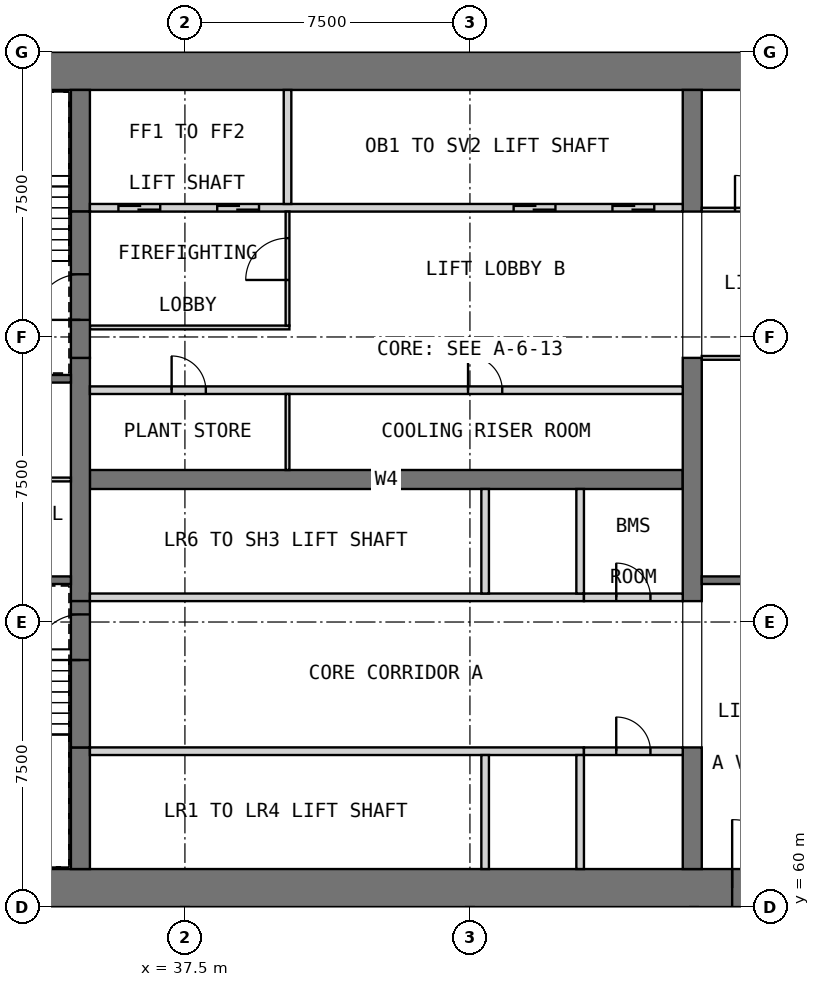
"""IFC4 building model, lengths in metres.
Left out: names, types, materials, properties, quantities, classifications, styles, units other than length and angle.
Written with IfcOpenShell. Run it as: python <this file> out.ifc"""

import sys

from ifc_helpers import new_model, si_unit, direction, frame, frame_2d, origin, place, context, subcontext, project, spatial, rectangle, extrude, element, fill, save


model = new_model("IFC4")
c1 = context("Model", 3, precision=1e-05, world=origin(), true_north=direction((0.0, 1.0)))
c2 = subcontext(c1, "Body", "Model", "MODEL_VIEW")
j1 = project(units=[si_unit("LENGTHUNIT", "METRE"), si_unit("PLANEANGLEUNIT", "RADIAN")], contexts=[c1])
p1 = place(None, origin())
s1 = spatial("IfcSite", under=j1, at=p1, CompositionType="ELEMENT")
p2 = place(p1, origin())
s2 = spatial("IfcBuilding", under=s1, at=p2, CompositionType="ELEMENT")
p3 = place(p2, frame((0.0, 0.0, 73.6)))
s3 = spatial("IfcBuildingStorey", under=s2, at=p3, CompositionType="ELEMENT", Elevation=73.6)
p4 = place(p3, frame((30.0, 60.5, 0.0), z_axis=(0.0, 0.0, 1.0), x_axis=(1.0, 0.0, 0.0)))
e1 = element("IfcWall", 1, at=p4, inside=s3, PredefinedType="SHEAR", context=c2, shape_type="SweptSolid", body=[
    extrude(rectangle(XDim=30.0, YDim=1.0, at=frame_2d((15.0, 0.0))), origin(), (0.0, 0.0, 1.0), 5.5),
])
p5 = place(p4, frame((21.9, 0.0, 0.0)))
e2 = element("IfcOpeningElement", 2, at=p5, cuts=e1, PredefinedType="OPENING", context=c2, shape_type="SweptSolid", body=[
    extrude(rectangle(XDim=1.8, YDim=2.1, at=frame_2d((0.9, 1.05))), frame((0.0, 0.51, 0.0), z_axis=(0.0, -1.0, 0.0), x_axis=(1.0, 0.0, 0.0)), (0.0, 0.0, 1.0), 1.02),
])
p6 = place(p4, frame((26.5, 0.0, 0.0)))
e3 = element("IfcOpeningElement", 3, at=p6, cuts=e1, PredefinedType="OPENING", context=c2, shape_type="SweptSolid", body=[
    extrude(rectangle(XDim=1.2, YDim=2.1, at=frame_2d((0.6, 1.05))), frame((0.0, 0.51, 0.0), z_axis=(0.0, -1.0, 0.0), x_axis=(1.0, 0.0, 0.0)), (0.0, 0.0, 1.0), 1.02),
])
p7 = place(p3, frame((30.0, 82.0, 0.0), z_axis=(0.0, 0.0, 1.0), x_axis=(1.0, 0.0, 0.0)))
e4 = element("IfcWall", 4, at=p7, inside=s3, PredefinedType="SHEAR", context=c2, shape_type="SweptSolid", body=[
    extrude(rectangle(XDim=30.0, YDim=1.0, at=frame_2d((15.0, 0.0))), origin(), (0.0, 0.0, 1.0), 5.5),
])
p8 = place(p3, frame((35.0, 71.25, 0.0), z_axis=(0.0, 0.0, 1.0), x_axis=(1.0, 0.0, 0.0)))
e5 = element("IfcWall", 5, at=p8, inside=s3, PredefinedType="SHEAR", context=c2, shape_type="SweptSolid", body=[
    extrude(rectangle(XDim=15.6, YDim=0.5, at=frame_2d((7.8, 0.0))), origin(), (0.0, 0.0, 1.0), 5.5),
])
p9 = place(p3, frame((34.75, 61.0, 0.0), z_axis=(0.0, 0.0, 1.0), x_axis=(0.0, 1.0, 0.0)))
e6 = element("IfcWall", 6, at=p9, inside=s3, PredefinedType="SHEAR", context=c2, shape_type="SweptSolid", body=[
    extrude(rectangle(XDim=3.2, YDim=0.5, at=frame_2d((1.6, 0.0))), origin(), (0.0, 0.0, 1.0), 5.5),
])
p10 = place(p3, frame((34.75, 68.05, 0.0), z_axis=(0.0, 0.0, 1.0), x_axis=(0.0, 1.0, 0.0)))
e7 = element("IfcWall", 7, at=p10, inside=s3, PredefinedType="SHEAR", context=c2, shape_type="SweptSolid", body=[
    extrude(rectangle(XDim=6.4, YDim=0.5, at=frame_2d((3.2, 0.0))), origin(), (0.0, 0.0, 1.0), 5.5),
])
for number, where, z_axis, x_axis in (
    (8, (34.75, 78.3, 0.0), (0.0, 0.0, 1.0), (0.0, 1.0, 0.0)),
    (9, (50.85, 61.0, 0.0), (0.0, 0.0, 1.0), (0.0, 1.0, 0.0)),
):
    element("IfcWall", number, at=place(p3, frame(where, z_axis=z_axis, x_axis=x_axis)), inside=s3, PredefinedType="SHEAR", context=c2, shape_type="SweptSolid", body=[
        extrude(rectangle(XDim=3.2, YDim=0.5, at=frame_2d((1.6, 0.0))), origin(), (0.0, 0.0, 1.0), 5.5),
    ])
p11 = place(p3, frame((50.85, 68.05, 0.0), z_axis=(0.0, 0.0, 1.0), x_axis=(0.0, 1.0, 0.0)))
e10 = element("IfcWall", 10, at=p11, inside=s3, PredefinedType="SHEAR", context=c2, shape_type="SweptSolid", body=[
    extrude(rectangle(XDim=6.4, YDim=0.5, at=frame_2d((3.2, 0.0))), origin(), (0.0, 0.0, 1.0), 5.5),
])
p12 = place(p3, frame((50.85, 78.3, 0.0), z_axis=(0.0, 0.0, 1.0), x_axis=(0.0, 1.0, 0.0)))
e11 = element("IfcWall", 11, at=p12, inside=s3, PredefinedType="SHEAR", context=c2, shape_type="SweptSolid", body=[
    extrude(rectangle(XDim=3.2, YDim=0.5, at=frame_2d((1.6, 0.0))), origin(), (0.0, 0.0, 1.0), 5.5),
])
p13 = place(p3, frame((35.0, 64.1, 0.0), z_axis=(0.0, 0.0, 1.0), x_axis=(1.0, 0.0, 0.0)))
e12 = element("IfcWall", 12, at=p13, inside=s3, PredefinedType="SOLIDWALL", context=c2, shape_type="SweptSolid", body=[
    extrude(rectangle(XDim=13.0, YDim=0.2, at=frame_2d((6.5, 0.0))), origin(), (0.0, 0.0, 1.0), 5.5),
])
for number, where, z_axis, x_axis in (
    (13, (45.4, 61.0, 0.0), (0.0, 0.0, 1.0), (0.0, 1.0, 0.0)),
    (14, (47.9, 61.0, 0.0), (0.0, 0.0, 1.0), (0.0, 1.0, 0.0)),
):
    element("IfcWall", number, at=place(p3, frame(where, z_axis=z_axis, x_axis=x_axis)), inside=s3, PredefinedType="SOLIDWALL", context=c2, shape_type="SweptSolid", body=[
        extrude(rectangle(XDim=3.0, YDim=0.2, at=frame_2d((1.5, 0.0))), origin(), (0.0, 0.0, 1.0), 5.5),
    ])
p14 = place(p3, frame((48.0, 64.1, 0.0), z_axis=(0.0, 0.0, 1.0), x_axis=(1.0, 0.0, 0.0)))
e15 = element("IfcWall", 15, at=p14, inside=s3, PredefinedType="PARTITIONING", context=c2, shape_type="SweptSolid", body=[
    extrude(rectangle(XDim=2.6, YDim=0.2, at=frame_2d((1.3, 0.0))), origin(), (0.0, 0.0, 1.0), 5.25),
])
p15 = place(p14, frame((0.85, 0.0, 0.0)))
e16 = element("IfcOpeningElement", 16, at=p15, cuts=e15, PredefinedType="OPENING", context=c2, shape_type="SweptSolid", body=[
    extrude(rectangle(XDim=0.9, YDim=2.1, at=frame_2d((0.45, 1.05))), frame((0.0, 0.11, 0.0), z_axis=(0.0, -1.0, 0.0), x_axis=(1.0, 0.0, 0.0)), (0.0, 0.0, 1.0), 0.22),
])
p16 = place(p3, frame((35.0, 68.15, 0.0), z_axis=(0.0, 0.0, 1.0), x_axis=(1.0, 0.0, 0.0)))
e17 = element("IfcWall", 17, at=p16, inside=s3, PredefinedType="SOLIDWALL", context=c2, shape_type="SweptSolid", body=[
    extrude(rectangle(XDim=13.0, YDim=0.2, at=frame_2d((6.5, 0.0))), origin(), (0.0, 0.0, 1.0), 5.5),
])
for number, where, z_axis, x_axis in (
    (18, (45.4, 68.25, 0.0), (0.0, 0.0, 1.0), (0.0, 1.0, 0.0)),
    (19, (47.9, 68.25, 0.0), (0.0, 0.0, 1.0), (0.0, 1.0, 0.0)),
):
    element("IfcWall", number, at=place(p3, frame(where, z_axis=z_axis, x_axis=x_axis)), inside=s3, PredefinedType="SOLIDWALL", context=c2, shape_type="SweptSolid", body=[
        extrude(rectangle(XDim=2.75, YDim=0.2, at=frame_2d((1.375, 0.0))), origin(), (0.0, 0.0, 1.0), 5.5),
    ])
p17 = place(p3, frame((48.0, 68.15, 0.0), z_axis=(0.0, 0.0, 1.0), x_axis=(1.0, 0.0, 0.0)))
e20 = element("IfcWall", 20, at=p17, inside=s3, PredefinedType="PARTITIONING", context=c2, shape_type="SweptSolid", body=[
    extrude(rectangle(XDim=2.6, YDim=0.2, at=frame_2d((1.3, 0.0))), origin(), (0.0, 0.0, 1.0), 5.25),
])
p18 = place(p17, frame((0.85, 0.0, 0.0)))
e21 = element("IfcOpeningElement", 21, at=p18, cuts=e20, PredefinedType="OPENING", context=c2, shape_type="SweptSolid", body=[
    extrude(rectangle(XDim=0.9, YDim=2.1, at=frame_2d((0.45, 1.05))), frame((0.0, 0.11, 0.0), z_axis=(0.0, -1.0, 0.0), x_axis=(1.0, 0.0, 0.0)), (0.0, 0.0, 1.0), 0.22),
])
p19 = place(p3, frame((35.0, 73.6, 0.0), z_axis=(0.0, 0.0, 1.0), x_axis=(1.0, 0.0, 0.0)))
e22 = element("IfcWall", 22, at=p19, inside=s3, PredefinedType="PARTITIONING", context=c2, shape_type="SweptSolid", body=[
    extrude(rectangle(XDim=15.6, YDim=0.2, at=frame_2d((7.8, 0.0))), origin(), (0.0, 0.0, 1.0), 5.25),
])
p20 = place(p19, frame((2.15, 0.0, 0.0)))
e23 = element("IfcOpeningElement", 23, at=p20, cuts=e22, PredefinedType="OPENING", context=c2, shape_type="SweptSolid", body=[
    extrude(rectangle(XDim=0.9, YDim=2.1, at=frame_2d((0.45, 1.05))), frame((0.0, 0.11, 0.0), z_axis=(0.0, -1.0, 0.0), x_axis=(1.0, 0.0, 0.0)), (0.0, 0.0, 1.0), 0.22),
])
p21 = place(p19, frame((9.95, 0.0, 0.0)))
e24 = element("IfcOpeningElement", 24, at=p21, cuts=e22, PredefinedType="OPENING", context=c2, shape_type="SweptSolid", body=[
    extrude(rectangle(XDim=0.9, YDim=2.1, at=frame_2d((0.45, 1.05))), frame((0.0, 0.11, 0.0), z_axis=(0.0, -1.0, 0.0), x_axis=(1.0, 0.0, 0.0)), (0.0, 0.0, 1.0), 0.22),
])
p22 = place(p3, frame((40.2, 71.5, 0.0), z_axis=(0.0, 0.0, 1.0), x_axis=(0.0, 1.0, 0.0)))
e25 = element("IfcWall", 25, at=p22, inside=s3, PredefinedType="PARTITIONING", context=c2, shape_type="SweptSolid", body=[
    extrude(rectangle(XDim=2.0, YDim=0.1, at=frame_2d((1.0, 0.0))), origin(), (0.0, 0.0, 1.0), 5.25),
])
p23 = place(p3, frame((35.0, 78.4, 0.0), z_axis=(0.0, 0.0, 1.0), x_axis=(1.0, 0.0, 0.0)))
e26 = element("IfcWall", 26, at=p23, inside=s3, PredefinedType="SOLIDWALL", context=c2, shape_type="SweptSolid", body=[
    extrude(rectangle(XDim=15.6, YDim=0.2, at=frame_2d((7.8, 0.0))), origin(), (0.0, 0.0, 1.0), 5.5),
])
p24 = place(p23, frame((0.75, 0.0, 0.0)))
e27 = element("IfcOpeningElement", 27, at=p24, cuts=e26, PredefinedType="OPENING", context=c2, shape_type="SweptSolid", body=[
    extrude(rectangle(XDim=1.1, YDim=2.1, at=frame_2d((0.55, 1.05))), frame((0.0, 0.11, 0.0), z_axis=(0.0, -1.0, 0.0), x_axis=(1.0, 0.0, 0.0)), (0.0, 0.0, 1.0), 0.22),
])
p25 = place(p23, frame((3.35, 0.0, 0.0)))
e28 = element("IfcOpeningElement", 28, at=p25, cuts=e26, PredefinedType="OPENING", context=c2, shape_type="SweptSolid", body=[
    extrude(rectangle(XDim=1.1, YDim=2.1, at=frame_2d((0.55, 1.05))), frame((0.0, 0.11, 0.0), z_axis=(0.0, -1.0, 0.0), x_axis=(1.0, 0.0, 0.0)), (0.0, 0.0, 1.0), 0.22),
])
p26 = place(p23, frame((11.15, 0.0, 0.0)))
e29 = element("IfcOpeningElement", 29, at=p26, cuts=e26, PredefinedType="OPENING", context=c2, shape_type="SweptSolid", body=[
    extrude(rectangle(XDim=1.1, YDim=2.1, at=frame_2d((0.55, 1.05))), frame((0.0, 0.11, 0.0), z_axis=(0.0, -1.0, 0.0), x_axis=(1.0, 0.0, 0.0)), (0.0, 0.0, 1.0), 0.22),
])
p27 = place(p23, frame((13.75, 0.0, 0.0)))
e30 = element("IfcOpeningElement", 30, at=p27, cuts=e26, PredefinedType="OPENING", context=c2, shape_type="SweptSolid", body=[
    extrude(rectangle(XDim=1.1, YDim=2.1, at=frame_2d((0.55, 1.05))), frame((0.0, 0.11, 0.0), z_axis=(0.0, -1.0, 0.0), x_axis=(1.0, 0.0, 0.0)), (0.0, 0.0, 1.0), 0.22),
])
p28 = place(p3, frame((40.2, 78.5, 0.0), z_axis=(0.0, 0.0, 1.0), x_axis=(0.0, 1.0, 0.0)))
e31 = element("IfcWall", 31, at=p28, inside=s3, PredefinedType="SOLIDWALL", context=c2, shape_type="SweptSolid", body=[
    extrude(rectangle(XDim=3.0, YDim=0.2, at=frame_2d((1.5, 0.0))), origin(), (0.0, 0.0, 1.0), 5.5),
])
p29 = place(p3, frame((35.0, 75.25, 0.0), z_axis=(0.0, 0.0, 1.0), x_axis=(1.0, 0.0, 0.0)))
e32 = element("IfcWall", 32, at=p29, inside=s3, PredefinedType="PARTITIONING", context=c2, shape_type="SweptSolid", body=[
    extrude(rectangle(XDim=5.25, YDim=0.1, at=frame_2d((2.625, 0.0))), origin(), (0.0, 0.0, 1.0), 5.25),
])
p30 = place(p3, frame((40.2, 75.3, 0.0), z_axis=(0.0, 0.0, 1.0), x_axis=(0.0, 1.0, 0.0)))
e33 = element("IfcWall", 33, at=p30, inside=s3, PredefinedType="PARTITIONING", context=c2, shape_type="SweptSolid", body=[
    extrude(rectangle(XDim=3.0, YDim=0.1, at=frame_2d((1.5, 0.0))), origin(), (0.0, 0.0, 1.0), 5.25),
])
p31 = place(p30, frame((1.2, 0.0, 0.0)))
e34 = element("IfcOpeningElement", 34, at=p31, cuts=e33, PredefinedType="OPENING", context=c2, shape_type="SweptSolid", body=[
    extrude(rectangle(XDim=1.1, YDim=2.1, at=frame_2d((0.55, 1.05))), frame((0.0, 0.06, 0.0), z_axis=(0.0, -1.0, 0.0), x_axis=(1.0, 0.0, 0.0)), (0.0, 0.0, 1.0), 0.12),
])
p32 = place(p3, frame((34.75, 64.2, 0.0), z_axis=(0.0, 0.0, 1.0), x_axis=(0.0, 1.0, 0.0)))
e35 = element("IfcWall", 35, at=p32, inside=s3, PredefinedType="SOLIDWALL", context=c2, shape_type="SweptSolid", body=[
    extrude(rectangle(XDim=3.85, YDim=0.5, at=frame_2d((1.925, 0.0))), origin(), (0.0, 0.0, 1.0), 4.3),
])
p33 = place(p32, frame((2.3, 0.0, 0.0)))
e36 = element("IfcOpeningElement", 36, at=p33, cuts=e35, PredefinedType="OPENING", context=c2, shape_type="SweptSolid", body=[
    extrude(rectangle(XDim=1.2, YDim=2.1, at=frame_2d((0.6, 1.05))), frame((0.0, 0.26, 0.0), z_axis=(0.0, -1.0, 0.0), x_axis=(1.0, 0.0, 0.0)), (0.0, 0.0, 1.0), 0.52),
])
p34 = place(p3, frame((34.75, 74.45, 0.0), z_axis=(0.0, 0.0, 1.0), x_axis=(0.0, 1.0, 0.0)))
e37 = element("IfcWall", 37, at=p34, inside=s3, PredefinedType="SOLIDWALL", context=c2, shape_type="SweptSolid", body=[
    extrude(rectangle(XDim=3.85, YDim=0.5, at=frame_2d((1.925, 0.0))), origin(), (0.0, 0.0, 1.0), 4.3),
])
p35 = place(p34, frame((1.0, 0.0, 0.0)))
e38 = element("IfcOpeningElement", 38, at=p35, cuts=e37, PredefinedType="OPENING", context=c2, shape_type="SweptSolid", body=[
    extrude(rectangle(XDim=1.2, YDim=2.1, at=frame_2d((0.6, 1.05))), frame((0.0, 0.26, 0.0), z_axis=(0.0, -1.0, 0.0), x_axis=(1.0, 0.0, 0.0)), (0.0, 0.0, 1.0), 0.52),
])
p36 = place(p3, frame((31.0, 68.6, 0.0), z_axis=(0.0, 0.0, 1.0), x_axis=(1.0, 0.0, 0.0)))
e39 = element("IfcWall", 39, at=p36, inside=s3, PredefinedType="SOLIDWALL", context=c2, shape_type="SweptSolid", body=[
    extrude(rectangle(XDim=3.5, YDim=0.2, at=frame_2d((1.75, 0.0))), origin(), (0.0, 0.0, 1.0), 5.25),
])
p37 = place(p36, frame((1.3, 0.0, 0.0)))
e40 = element("IfcOpeningElement", 40, at=p37, cuts=e39, PredefinedType="OPENING", context=c2, shape_type="SweptSolid", body=[
    extrude(rectangle(XDim=0.9, YDim=2.1, at=frame_2d((0.45, 1.05))), frame((0.0, 0.11, 0.0), z_axis=(0.0, -1.0, 0.0), x_axis=(1.0, 0.0, 0.0)), (0.0, 0.0, 1.0), 0.22),
])
p38 = place(p3, frame((31.0, 73.9, 0.0), z_axis=(0.0, 0.0, 1.0), x_axis=(1.0, 0.0, 0.0)))
e41 = element("IfcWall", 41, at=p38, inside=s3, PredefinedType="SOLIDWALL", context=c2, shape_type="SweptSolid", body=[
    extrude(rectangle(XDim=3.5, YDim=0.2, at=frame_2d((1.75, 0.0))), origin(), (0.0, 0.0, 1.0), 5.25),
])
p39 = place(p38, frame((1.3, 0.0, 0.0)))
e42 = element("IfcOpeningElement", 42, at=p39, cuts=e41, PredefinedType="OPENING", context=c2, shape_type="SweptSolid", body=[
    extrude(rectangle(XDim=0.9, YDim=2.1, at=frame_2d((0.45, 1.05))), frame((0.0, 0.11, 0.0), z_axis=(0.0, -1.0, 0.0), x_axis=(1.0, 0.0, 0.0)), (0.0, 0.0, 1.0), 0.22),
])
p40 = place(p3, frame((51.1, 68.6, 0.0), z_axis=(0.0, 0.0, 1.0), x_axis=(1.0, 0.0, 0.0)))
e43 = element("IfcWall", 43, at=p40, inside=s3, PredefinedType="SOLIDWALL", context=c2, shape_type="SweptSolid", body=[
    extrude(rectangle(XDim=7.9, YDim=0.2, at=frame_2d((3.95, 0.0))), origin(), (0.0, 0.0, 1.0), 5.25),
])
p41 = place(p3, frame((31.0, 71.25, 0.0), z_axis=(0.0, 0.0, 1.0), x_axis=(1.0, 0.0, 0.0)))
e44 = element("IfcWall", 44, at=p41, inside=s3, PredefinedType="PARTITIONING", context=c2, shape_type="SweptSolid", body=[
    extrude(rectangle(XDim=3.5, YDim=0.1, at=frame_2d((1.75, 0.0))), origin(), (0.0, 0.0, 1.0), 5.25),
])
p42 = place(p3, frame((51.1, 74.45, 0.0), z_axis=(0.0, 0.0, 1.0), x_axis=(1.0, 0.0, 0.0)))
e45 = element("IfcWall", 45, at=p42, inside=s3, PredefinedType="PARTITIONING", context=c2, shape_type="SweptSolid", body=[
    extrude(rectangle(XDim=7.9, YDim=0.1, at=frame_2d((3.95, 0.0))), origin(), (0.0, 0.0, 1.0), 5.25),
])
p43 = place(p42, frame((3.5, 0.0, 0.0)))
e46 = element("IfcOpeningElement", 46, at=p43, cuts=e45, PredefinedType="OPENING", context=c2, shape_type="SweptSolid", body=[
    extrude(rectangle(XDim=0.9, YDim=2.1, at=frame_2d((0.45, 1.05))), frame((0.0, 0.06, 0.0), z_axis=(0.0, -1.0, 0.0), x_axis=(1.0, 0.0, 0.0)), (0.0, 0.0, 1.0), 0.12),
])
p44 = place(p3, frame((51.1, 78.35, 0.0), z_axis=(0.0, 0.0, 1.0), x_axis=(1.0, 0.0, 0.0)))
e47 = element("IfcWall", 47, at=p44, inside=s3, PredefinedType="PARTITIONING", context=c2, shape_type="SweptSolid", body=[
    extrude(rectangle(XDim=7.9, YDim=0.1, at=frame_2d((3.95, 0.0))), origin(), (0.0, 0.0, 1.0), 5.25),
])
p45 = place(p44, frame((0.875, 0.0, 0.0)))
e48 = element("IfcOpeningElement", 48, at=p45, cuts=e47, PredefinedType="OPENING", context=c2, shape_type="SweptSolid", body=[
    extrude(rectangle(XDim=0.9, YDim=2.1, at=frame_2d((0.45, 1.05))), frame((0.0, 0.06, 0.0), z_axis=(0.0, -1.0, 0.0), x_axis=(1.0, 0.0, 0.0)), (0.0, 0.0, 1.0), 0.12),
])
p46 = place(p44, frame((4.825, 0.0, 0.0)))
e49 = element("IfcOpeningElement", 49, at=p46, cuts=e47, PredefinedType="OPENING", context=c2, shape_type="SweptSolid", body=[
    extrude(rectangle(XDim=0.9, YDim=2.1, at=frame_2d((0.45, 1.05))), frame((0.0, 0.06, 0.0), z_axis=(0.0, -1.0, 0.0), x_axis=(1.0, 0.0, 0.0)), (0.0, 0.0, 1.0), 0.12),
])
p47 = place(p15, origin())
e50 = element("IfcDoor", 50, at=p47, inside=s3, OperationType="SINGLE_SWING_LEFT", PredefinedType="DOOR", context=c2, shape_type="SweptSolid", body=[
    extrude(rectangle(XDim=0.9, YDim=2.1, at=frame_2d((0.45, 1.05))), frame((0.0, 0.025, 0.0), z_axis=(0.0, -1.0, 0.0), x_axis=(1.0, 0.0, 0.0)), (0.0, 0.0, 1.0), 0.05),
])
fill(e16, e50)
p48 = place(p18, origin())
e51 = element("IfcDoor", 51, at=p48, inside=s3, OperationType="SINGLE_SWING_LEFT", PredefinedType="DOOR", context=c2, shape_type="SweptSolid", body=[
    extrude(rectangle(XDim=0.9, YDim=2.1, at=frame_2d((0.45, 1.05))), frame((0.0, 0.025, 0.0), z_axis=(0.0, -1.0, 0.0), x_axis=(1.0, 0.0, 0.0)), (0.0, 0.0, 1.0), 0.05),
])
fill(e21, e51)
p49 = place(p20, origin())
e52 = element("IfcDoor", 52, at=p49, inside=s3, OperationType="SINGLE_SWING_LEFT", PredefinedType="DOOR", context=c2, shape_type="SweptSolid", body=[
    extrude(rectangle(XDim=0.9, YDim=2.1, at=frame_2d((0.45, 1.05))), frame((0.0, 0.025, 0.0), z_axis=(0.0, -1.0, 0.0), x_axis=(1.0, 0.0, 0.0)), (0.0, 0.0, 1.0), 0.05),
])
fill(e23, e52)
p50 = place(p21, origin())
e53 = element("IfcDoor", 53, at=p50, inside=s3, OperationType="SINGLE_SWING_RIGHT", PredefinedType="DOOR", context=c2, shape_type="SweptSolid", body=[
    extrude(rectangle(XDim=0.9, YDim=2.1, at=frame_2d((0.45, 1.05))), frame((0.0, 0.025, 0.0), z_axis=(0.0, -1.0, 0.0), x_axis=(1.0, 0.0, 0.0)), (0.0, 0.0, 1.0), 0.05),
])
fill(e24, e53)
p51 = place(p24, origin())
e54 = element("IfcDoor", 54, at=p51, inside=s3, OperationType="DOUBLE_DOOR_SLIDING", PredefinedType="DOOR", context=c2, shape_type="SweptSolid", body=[
    extrude(rectangle(XDim=1.1, YDim=2.1, at=frame_2d((0.55, 1.05))), frame((0.0, 0.025, 0.0), z_axis=(0.0, -1.0, 0.0), x_axis=(1.0, 0.0, 0.0)), (0.0, 0.0, 1.0), 0.05),
])
fill(e27, e54)
p52 = place(p25, origin())
e55 = element("IfcDoor", 55, at=p52, inside=s3, OperationType="DOUBLE_DOOR_SLIDING", PredefinedType="DOOR", context=c2, shape_type="SweptSolid", body=[
    extrude(rectangle(XDim=1.1, YDim=2.1, at=frame_2d((0.55, 1.05))), frame((0.0, 0.025, 0.0), z_axis=(0.0, -1.0, 0.0), x_axis=(1.0, 0.0, 0.0)), (0.0, 0.0, 1.0), 0.05),
])
fill(e28, e55)
p53 = place(p26, origin())
e56 = element("IfcDoor", 56, at=p53, inside=s3, OperationType="DOUBLE_DOOR_SLIDING", PredefinedType="DOOR", context=c2, shape_type="SweptSolid", body=[
    extrude(rectangle(XDim=1.1, YDim=2.1, at=frame_2d((0.55, 1.05))), frame((0.0, 0.025, 0.0), z_axis=(0.0, -1.0, 0.0), x_axis=(1.0, 0.0, 0.0)), (0.0, 0.0, 1.0), 0.05),
])
fill(e29, e56)
p54 = place(p27, origin())
e57 = element("IfcDoor", 57, at=p54, inside=s3, OperationType="DOUBLE_DOOR_SLIDING", PredefinedType="DOOR", context=c2, shape_type="SweptSolid", body=[
    extrude(rectangle(XDim=1.1, YDim=2.1, at=frame_2d((0.55, 1.05))), frame((0.0, 0.025, 0.0), z_axis=(0.0, -1.0, 0.0), x_axis=(1.0, 0.0, 0.0)), (0.0, 0.0, 1.0), 0.05),
])
fill(e30, e57)
p55 = place(p5, origin())
e58 = element("IfcDoor", 58, at=p55, inside=s3, OperationType="DOUBLE_DOOR_SINGLE_SWING", PredefinedType="DOOR", context=c2, shape_type="SweptSolid", body=[
    extrude(rectangle(XDim=1.8, YDim=2.1, at=frame_2d((0.9, 1.05))), frame((0.0, 0.025, 0.0), z_axis=(0.0, -1.0, 0.0), x_axis=(1.0, 0.0, 0.0)), (0.0, 0.0, 1.0), 0.05),
])
fill(e2, e58)
p56 = place(p31, origin())
e59 = element("IfcDoor", 59, at=p56, inside=s3, OperationType="SINGLE_SWING_LEFT", PredefinedType="DOOR", context=c2, shape_type="SweptSolid", body=[
    extrude(rectangle(XDim=1.1, YDim=2.1, at=frame_2d((0.55, 1.05))), frame((0.0, 0.025, 0.0), z_axis=(0.0, -1.0, 0.0), x_axis=(1.0, 0.0, 0.0)), (0.0, 0.0, 1.0), 0.05),
])
fill(e34, e59)
p57 = place(p33, origin())
e60 = element("IfcDoor", 60, at=p57, inside=s3, OperationType="SINGLE_SWING_LEFT", PredefinedType="DOOR", context=c2, shape_type="SweptSolid", body=[
    extrude(rectangle(XDim=1.2, YDim=2.1, at=frame_2d((0.6, 1.05))), frame((0.0, 0.025, 0.0), z_axis=(0.0, -1.0, 0.0), x_axis=(1.0, 0.0, 0.0)), (0.0, 0.0, 1.0), 0.05),
])
fill(e36, e60)
p58 = place(p35, origin())
e61 = element("IfcDoor", 61, at=p58, inside=s3, OperationType="SINGLE_SWING_RIGHT", PredefinedType="DOOR", context=c2, shape_type="SweptSolid", body=[
    extrude(rectangle(XDim=1.2, YDim=2.1, at=frame_2d((0.6, 1.05))), frame((0.0, 0.025, 0.0), z_axis=(0.0, -1.0, 0.0), x_axis=(1.0, 0.0, 0.0)), (0.0, 0.0, 1.0), 0.05),
])
fill(e38, e61)
p59 = place(p45, origin())
e62 = element("IfcDoor", 62, at=p59, inside=s3, OperationType="SINGLE_SWING_LEFT", PredefinedType="DOOR", context=c2, shape_type="SweptSolid", body=[
    extrude(rectangle(XDim=0.9, YDim=2.1, at=frame_2d((0.45, 1.05))), frame((0.0, 0.025, 0.0), z_axis=(0.0, -1.0, 0.0), x_axis=(1.0, 0.0, 0.0)), (0.0, 0.0, 1.0), 0.05),
])
fill(e48, e62)
save(model, sys.argv[1])
